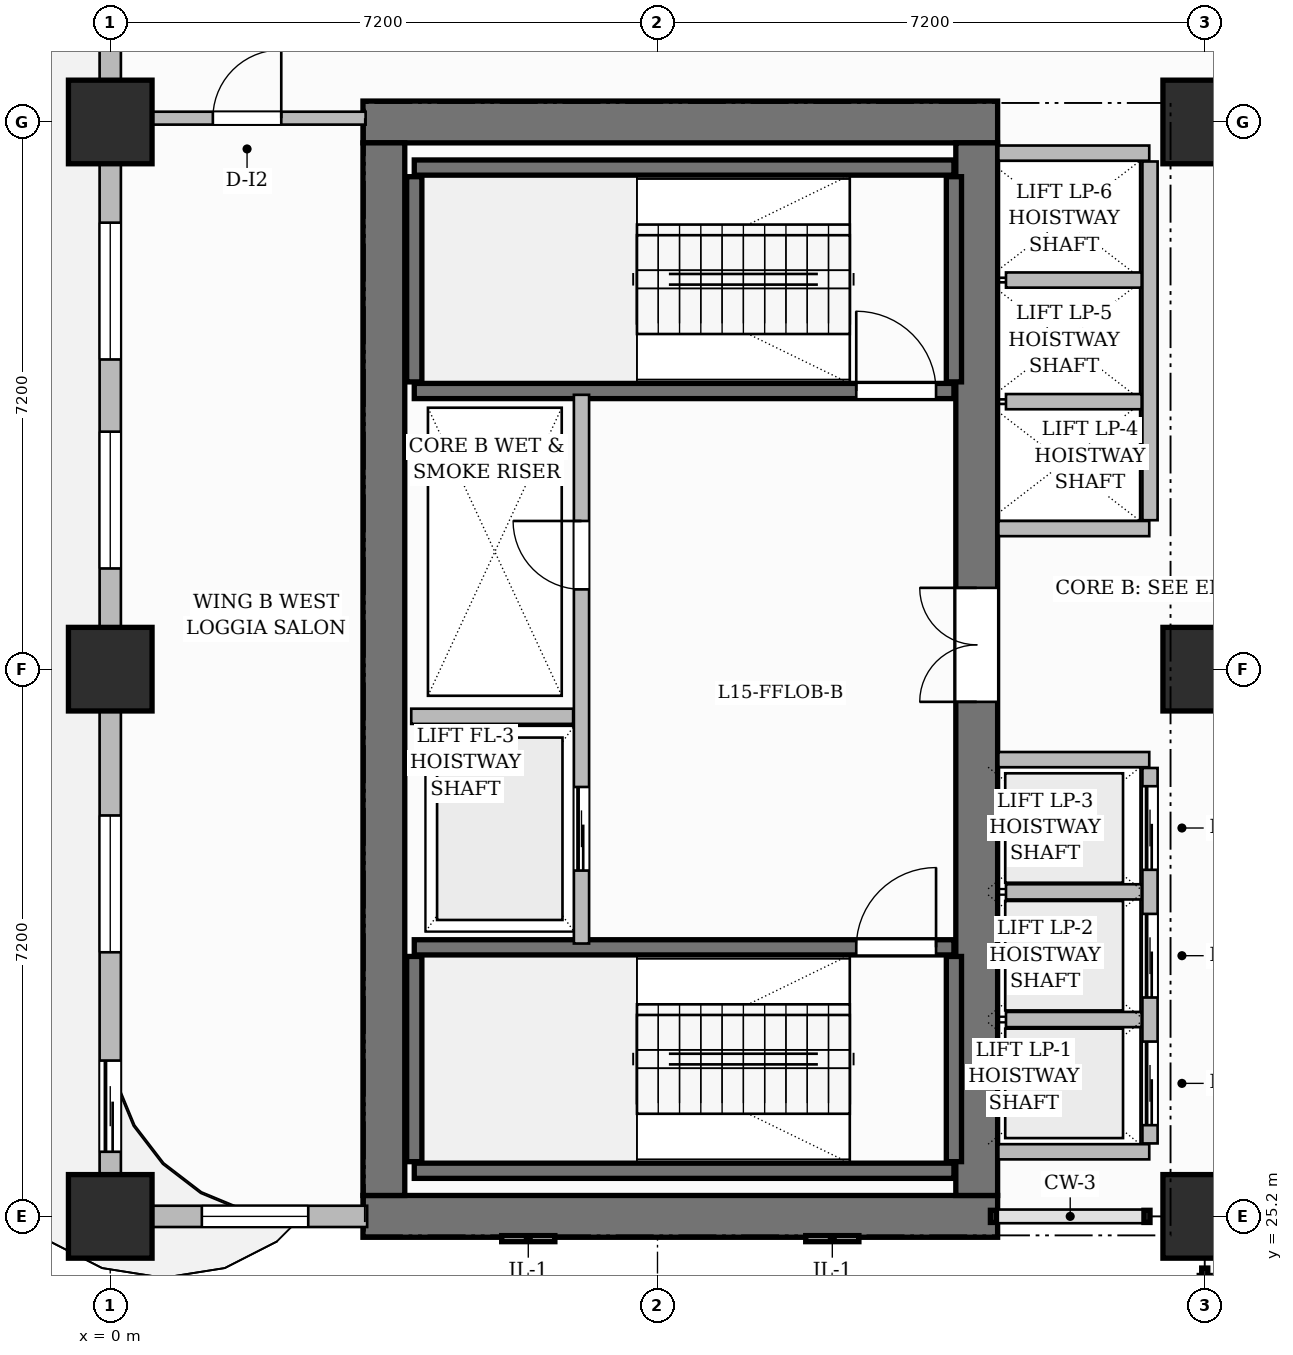
"""IFC4 building model, lengths in metres.
Left out: names, types, materials, properties, quantities, classifications, styles, units other than length and angle.
Written with IfcOpenShell. Run it as: python <this file> out.ifc"""

import sys

from ifc_helpers import new_model, si_unit, direction, frame, frame_2d, origin, origin_2d, place, context, subcontext, project, spatial, rectangle, extrude, source, transform, mapped, element, fill, save


model = new_model("IFC4")
c1 = context("Model", 3, precision=1e-05, world=origin(), true_north=direction((0.0, 1.0)))
c2 = subcontext(c1, "Body", "Model", "MODEL_VIEW")
j1 = project(units=[si_unit("LENGTHUNIT", "METRE"), si_unit("PLANEANGLEUNIT", "RADIAN")], contexts=[c1])
p1 = place(None, origin())
s1 = spatial("IfcSite", under=j1, at=p1, CompositionType="ELEMENT")
p2 = place(p1, origin())
s2 = spatial("IfcBuilding", under=s1, at=p2, CompositionType="ELEMENT")
p3 = place(p2, frame((0.0, 0.0, 65.7)))
s3 = spatial("IfcBuildingStorey", under=s2, at=p3, CompositionType="ELEMENT", Elevation=65.7)
for number, where, z_axis, x_axis in (
    (1, (3.325, 25.2, 0.0), (0.0, 0.0, 1.0), (1.0, 0.0, 0.0)),
    (2, (3.325, 39.6, 0.0), (0.0, 0.0, 1.0), (1.0, 0.0, 0.0)),
):
    element("IfcWall", number, at=place(p3, frame(where, z_axis=z_axis, x_axis=x_axis)), inside=s3, PredefinedType="SHEAR", context=c2, shape_type="SweptSolid", body=[
        extrude(rectangle(XDim=8.35, YDim=0.55, at=frame_2d((4.175, 0.0))), origin(), (0.0, 0.0, 1.0), 3.7),
    ])
p4 = place(p3, frame((3.6, 25.475, 0.0), z_axis=(0.0, 0.0, 1.0), x_axis=(0.0, 1.0, 0.0)))
e3 = element("IfcWall", 3, at=p4, inside=s3, PredefinedType="SHEAR", context=c2, shape_type="SweptSolid", body=[
    extrude(rectangle(XDim=13.85, YDim=0.55, at=frame_2d((6.925, 0.0))), origin(), (0.0, 0.0, 1.0), 3.7),
])
p5 = place(p3, frame((11.4, 25.475, 0.0), z_axis=(0.0, 0.0, 1.0), x_axis=(0.0, 1.0, 0.0)))
e4 = element("IfcWall", 4, at=p5, inside=s3, PredefinedType="SHEAR", context=c2, shape_type="SweptSolid", body=[
    extrude(rectangle(XDim=13.85, YDim=0.55, at=frame_2d((6.925, 0.0))), origin(), (0.0, 0.0, 1.0), 3.7),
])
p6 = place(p5, frame((6.495, 0.0, 0.0)))
e5 = element("IfcOpeningElement", 5, at=p6, cuts=e4, PredefinedType="OPENING", context=c2, shape_type="SweptSolid", body=[
    extrude(rectangle(XDim=1.5, YDim=2.2, at=frame_2d((0.75, 1.1))), frame((0.0, 0.285, 0.0), z_axis=(0.0, -1.0, 0.0), x_axis=(1.0, 0.0, 0.0)), (0.0, 0.0, 1.0), 0.57),
])
m1 = source(origin(), c2, "Body", "SweptSolid", [
    extrude(rectangle(XDim=1.1, YDim=1.1, at=origin_2d()), origin(), (0.0, 0.0, 1.0), 3.7),
])
for number, where, z_axis, x_axis in (
    (6, (0.0, 25.2, 0.0), (0.0, 0.0, 1.0), (1.0, 0.0, 0.0)),
    (7, (0.0, 32.4, 0.0), (0.0, 0.0, 1.0), (1.0, 0.0, 0.0)),
    (8, (0.0, 39.6, 0.0), (0.0, 0.0, 1.0), (1.0, 0.0, 0.0)),
    (9, (14.4, 25.2, 0.0), (0.0, 0.0, 1.0), (1.0, 0.0, 0.0)),
    (10, (14.4, 32.4, 0.0), (0.0, 0.0, 1.0), (1.0, 0.0, 0.0)),
    (11, (14.4, 39.6, 0.0), (0.0, 0.0, 1.0), (1.0, 0.0, 0.0)),
):
    element("IfcColumn", number, at=place(p3, frame(where, z_axis=z_axis, x_axis=x_axis)), inside=s3, PredefinedType="COLUMN", context=c2, shape_type="MappedRepresentation", body=[
        mapped(m1, transform((0.0, 0.0, 0.0), scale=1.0)),
    ])
p7 = place(p3, frame((4.0, 25.8, 0.0), z_axis=(0.0, 0.0, 1.0), x_axis=(1.0, 0.0, 0.0)))
e12 = element("IfcWall", 12, at=p7, inside=s3, PredefinedType="SHEAR", context=c2, shape_type="SweptSolid", body=[
    extrude(rectangle(XDim=7.1, YDim=0.2, at=frame_2d((3.55, 0.0))), origin(), (0.0, 0.0, 1.0), 3.7),
])
for number, where, z_axis, x_axis in (
    (13, (4.0, 25.92, 0.0), (0.0, 0.0, 1.0), (0.0, 1.0, 0.0)),
    (14, (11.1, 25.92, 0.0), (0.0, 0.0, 1.0), (0.0, 1.0, 0.0)),
):
    element("IfcWall", number, at=place(p3, frame(where, z_axis=z_axis, x_axis=x_axis)), inside=s3, PredefinedType="SHEAR", context=c2, shape_type="SweptSolid", body=[
        extrude(rectangle(XDim=2.7, YDim=0.2, at=frame_2d((1.35, 0.0))), origin(), (0.0, 0.0, 1.0), 3.7),
    ])
p8 = place(p3, frame((4.0, 28.74, 0.0), z_axis=(0.0, 0.0, 1.0), x_axis=(1.0, 0.0, 0.0)))
e15 = element("IfcWall", 15, at=p8, inside=s3, PredefinedType="SHEAR", context=c2, shape_type="SweptSolid", body=[
    extrude(rectangle(XDim=7.1, YDim=0.2, at=frame_2d((3.55, 0.0))), origin(), (0.0, 0.0, 1.0), 3.7),
])
p9 = place(p8, frame((5.815, 0.0, 0.0)))
e16 = element("IfcOpeningElement", 16, at=p9, cuts=e15, PredefinedType="OPENING", context=c2, shape_type="SweptSolid", body=[
    extrude(rectangle(XDim=1.05, YDim=2.2, at=frame_2d((0.525, 1.1))), frame((0.0, 0.11, 0.0), z_axis=(0.0, -1.0, 0.0), x_axis=(1.0, 0.0, 0.0)), (0.0, 0.0, 1.0), 0.22),
])
p10 = place(p3, frame((4.0, 39.0, 0.0), z_axis=(0.0, 0.0, 1.0), x_axis=(1.0, 0.0, 0.0)))
e17 = element("IfcWall", 17, at=p10, inside=s3, PredefinedType="SHEAR", context=c2, shape_type="SweptSolid", body=[
    extrude(rectangle(XDim=7.1, YDim=0.2, at=frame_2d((3.55, 0.0))), origin(), (0.0, 0.0, 1.0), 3.7),
])
for number, where, z_axis, x_axis in (
    (18, (4.0, 36.18, 0.0), (0.0, 0.0, 1.0), (0.0, 1.0, 0.0)),
    (19, (11.1, 36.18, 0.0), (0.0, 0.0, 1.0), (0.0, 1.0, 0.0)),
):
    element("IfcWall", number, at=place(p3, frame(where, z_axis=z_axis, x_axis=x_axis)), inside=s3, PredefinedType="SHEAR", context=c2, shape_type="SweptSolid", body=[
        extrude(rectangle(XDim=2.7, YDim=0.2, at=frame_2d((1.35, 0.0))), origin(), (0.0, 0.0, 1.0), 3.7),
    ])
p11 = place(p3, frame((4.0, 36.06, 0.0), z_axis=(0.0, 0.0, 1.0), x_axis=(1.0, 0.0, 0.0)))
e20 = element("IfcWall", 20, at=p11, inside=s3, PredefinedType="SHEAR", context=c2, shape_type="SweptSolid", body=[
    extrude(rectangle(XDim=7.1, YDim=0.2, at=frame_2d((3.55, 0.0))), origin(), (0.0, 0.0, 1.0), 3.7),
])
p12 = place(p11, frame((5.815, 0.0, 0.0)))
e21 = element("IfcOpeningElement", 21, at=p12, cuts=e20, PredefinedType="OPENING", context=c2, shape_type="SweptSolid", body=[
    extrude(rectangle(XDim=1.05, YDim=2.2, at=frame_2d((0.525, 1.1))), frame((0.0, 0.11, 0.0), z_axis=(0.0, -1.0, 0.0), x_axis=(1.0, 0.0, 0.0)), (0.0, 0.0, 1.0), 0.22),
])
p13 = place(p3, frame((6.2, 28.79, 0.0), z_axis=(0.0, 0.0, 1.0), x_axis=(0.0, 1.0, 0.0)))
e22 = element("IfcWall", 22, at=p13, inside=s3, PredefinedType="PARTITIONING", context=c2, shape_type="SweptSolid", body=[
    extrude(rectangle(XDim=7.22, YDim=0.2, at=frame_2d((3.61, 0.0))), origin(), (0.0, 0.0, 1.0), 3.45),
])
p14 = place(p13, frame((4.66, 0.0, 0.0)))
e23 = element("IfcOpeningElement", 23, at=p14, cuts=e22, PredefinedType="OPENING", context=c2, shape_type="SweptSolid", body=[
    extrude(rectangle(XDim=0.9, YDim=2.1, at=frame_2d((0.45, 1.05))), frame((0.0, 0.11, 0.0), z_axis=(0.0, -1.0, 0.0), x_axis=(1.0, 0.0, 0.0)), (0.0, 0.0, 1.0), 0.22),
])
p15 = place(p13, frame((0.96, 0.0, 0.0)))
e24 = element("IfcOpeningElement", 24, at=p15, cuts=e22, PredefinedType="OPENING", context=c2, shape_type="SweptSolid", body=[
    extrude(rectangle(XDim=1.1, YDim=2.2, at=frame_2d((0.55, 1.1))), frame((0.0, 0.11, 0.0), z_axis=(0.0, -1.0, 0.0), x_axis=(1.0, 0.0, 0.0)), (0.0, 0.0, 1.0), 0.22),
])
p16 = place(p3, frame((3.96, 31.78, 0.0), z_axis=(0.0, 0.0, 1.0), x_axis=(1.0, 0.0, 0.0)))
e25 = element("IfcWall", 25, at=p16, inside=s3, PredefinedType="PARTITIONING", context=c2, shape_type="SweptSolid", body=[
    extrude(rectangle(XDim=2.13, YDim=0.2, at=frame_2d((1.065, 0.0))), origin(), (0.0, 0.0, 1.0), 3.45),
])
for number, where, z_axis, x_axis in (
    (26, (11.685, 26.05, 0.0), (0.0, 0.0, 1.0), (1.0, 0.0, 0.0)),
    (27, (11.685, 31.21, 0.0), (0.0, 0.0, 1.0), (1.0, 0.0, 0.0)),
):
    element("IfcWall", number, at=place(p3, frame(where, z_axis=z_axis, x_axis=x_axis)), inside=s3, PredefinedType="PARTITIONING", context=c2, shape_type="SweptSolid", body=[
        extrude(rectangle(XDim=1.985, YDim=0.2, at=frame_2d((0.992, 0.0))), origin(), (0.0, 0.0, 1.0), 3.45),
    ])
p17 = place(p3, frame((13.68, 26.16, 0.0), z_axis=(0.0, 0.0, 1.0), x_axis=(0.0, 1.0, 0.0)))
e28 = element("IfcWall", 28, at=p17, inside=s3, PredefinedType="PARTITIONING", context=c2, shape_type="SweptSolid", body=[
    extrude(rectangle(XDim=4.94, YDim=0.2, at=frame_2d((2.47, 0.0))), origin(), (0.0, 0.0, 1.0), 3.45),
])
p18 = place(p17, frame((0.24, 0.0, 0.0)))
e29 = element("IfcOpeningElement", 29, at=p18, cuts=e28, PredefinedType="OPENING", context=c2, shape_type="SweptSolid", body=[
    extrude(rectangle(XDim=1.1, YDim=2.2, at=frame_2d((0.55, 1.1))), frame((0.0, 0.11, 0.0), z_axis=(0.0, -1.0, 0.0), x_axis=(1.0, 0.0, 0.0)), (0.0, 0.0, 1.0), 0.22),
])
p19 = place(p17, frame((1.92, 0.0, 0.0)))
e30 = element("IfcOpeningElement", 30, at=p19, cuts=e28, PredefinedType="OPENING", context=c2, shape_type="SweptSolid", body=[
    extrude(rectangle(XDim=1.1, YDim=2.2, at=frame_2d((0.55, 1.1))), frame((0.0, 0.11, 0.0), z_axis=(0.0, -1.0, 0.0), x_axis=(1.0, 0.0, 0.0)), (0.0, 0.0, 1.0), 0.22),
])
p20 = place(p17, frame((3.6, 0.0, 0.0)))
e31 = element("IfcOpeningElement", 31, at=p20, cuts=e28, PredefinedType="OPENING", context=c2, shape_type="SweptSolid", body=[
    extrude(rectangle(XDim=1.1, YDim=2.2, at=frame_2d((0.55, 1.1))), frame((0.0, 0.11, 0.0), z_axis=(0.0, -1.0, 0.0), x_axis=(1.0, 0.0, 0.0)), (0.0, 0.0, 1.0), 0.22),
])
for number, where, z_axis, x_axis in (
    (32, (11.785, 27.79, 0.0), (0.0, 0.0, 1.0), (1.0, 0.0, 0.0)),
    (33, (11.785, 29.47, 0.0), (0.0, 0.0, 1.0), (1.0, 0.0, 0.0)),
):
    element("IfcWall", number, at=place(p3, frame(where, z_axis=z_axis, x_axis=x_axis)), inside=s3, PredefinedType="PARTITIONING", context=c2, shape_type="SweptSolid", body=[
        extrude(rectangle(XDim=1.785, YDim=0.2, at=frame_2d((0.893, 0.0))), origin(), (0.0, 0.0, 1.0), 3.45),
    ])
for number, where, z_axis, x_axis in (
    (34, (11.685, 34.25, 0.0), (0.0, 0.0, 1.0), (1.0, 0.0, 0.0)),
    (35, (11.685, 39.19, 0.0), (0.0, 0.0, 1.0), (1.0, 0.0, 0.0)),
):
    element("IfcWall", number, at=place(p3, frame(where, z_axis=z_axis, x_axis=x_axis)), inside=s3, PredefinedType="PARTITIONING", context=c2, shape_type="SweptSolid", body=[
        extrude(rectangle(XDim=1.985, YDim=0.2, at=frame_2d((0.992, 0.0))), origin(), (0.0, 0.0, 1.0), 3.45),
    ])
p21 = place(p3, frame((13.68, 34.36, 0.0), z_axis=(0.0, 0.0, 1.0), x_axis=(0.0, 1.0, 0.0)))
e36 = element("IfcWall", 36, at=p21, inside=s3, PredefinedType="PARTITIONING", context=c2, shape_type="SweptSolid", body=[
    extrude(rectangle(XDim=4.72, YDim=0.2, at=frame_2d((2.36, 0.0))), origin(), (0.0, 0.0, 1.0), 3.45),
])
for number, where, z_axis, x_axis in (
    (37, (11.785, 35.92, 0.0), (0.0, 0.0, 1.0), (1.0, 0.0, 0.0)),
    (38, (11.785, 37.52, 0.0), (0.0, 0.0, 1.0), (1.0, 0.0, 0.0)),
):
    element("IfcWall", number, at=place(p3, frame(where, z_axis=z_axis, x_axis=x_axis)), inside=s3, PredefinedType="PARTITIONING", context=c2, shape_type="SweptSolid", body=[
        extrude(rectangle(XDim=1.785, YDim=0.2, at=frame_2d((0.893, 0.0))), origin(), (0.0, 0.0, 1.0), 3.45),
    ])
p22 = place(p3, frame((0.24, 39.65, 0.0), z_axis=(0.0, 0.0, 1.0), x_axis=(1.0, 0.0, 0.0)))
e39 = element("IfcWall", 39, at=p22, inside=s3, PredefinedType="PARTITIONING", context=c2, shape_type="SweptSolid", body=[
    extrude(rectangle(XDim=3.12, YDim=0.17, at=frame_2d((1.56, 0.0))), origin(), (0.0, 0.0, 1.0), 3.45),
])
p23 = place(p22, frame((1.11, 0.0, 0.0)))
e40 = element("IfcOpeningElement", 40, at=p23, cuts=e39, PredefinedType="OPENING", context=c2, shape_type="SweptSolid", body=[
    extrude(rectangle(XDim=0.9, YDim=2.15, at=frame_2d((0.45, 1.075))), frame((0.0, 0.095, 0.0), z_axis=(0.0, -1.0, 0.0), x_axis=(1.0, 0.0, 0.0)), (0.0, 0.0, 1.0), 0.19),
])
p24 = place(p3, frame((0.0, 25.2, 0.0), z_axis=(0.0, 0.0, 1.0), x_axis=(1.0, 0.0, 0.0)))
e41 = element("IfcWall", 41, at=p24, inside=s3, PredefinedType="SOLIDWALL", context=c2, shape_type="SweptSolid", body=[
    extrude(rectangle(XDim=3.38, YDim=0.28, at=frame_2d((1.69, 0.0))), origin(), (0.0, 0.0, 1.0), 3.45),
])
p25 = place(p24, frame((1.205, 0.0, 0.8)))
e42 = element("IfcOpeningElement", 42, at=p25, cuts=e41, PredefinedType="OPENING", context=c2, shape_type="SweptSolid", body=[
    extrude(rectangle(XDim=1.4, YDim=1.85, at=frame_2d((0.7, 0.925))), frame((0.0, 0.15, 0.0), z_axis=(0.0, -1.0, 0.0), x_axis=(1.0, 0.0, 0.0)), (0.0, 0.0, 1.0), 0.3),
])
p26 = place(p3, frame((0.0, 25.25, 0.0), z_axis=(0.0, 0.0, 1.0), x_axis=(0.0, 1.0, 0.0)))
e43 = element("IfcWall", 43, at=p26, inside=s3, PredefinedType="SOLIDWALL", context=c2, shape_type="SweptSolid", body=[
    extrude(rectangle(XDim=21.5, YDim=0.28, at=frame_2d((10.75, 0.0))), origin(), (0.0, 0.0, 1.0), 2.885),
])
p27 = place(p26, frame((18.45, 0.0, 0.0)))
e44 = element("IfcOpeningElement", 44, at=p27, cuts=e43, PredefinedType="OPENING", context=c2, shape_type="SweptSolid", body=[
    extrude(rectangle(XDim=1.2, YDim=2.2, at=frame_2d((0.6, 1.1))), frame((0.0, 0.15, 0.0), z_axis=(0.0, -1.0, 0.0), x_axis=(1.0, 0.0, 0.0)), (0.0, 0.0, 1.0), 0.3),
])
p28 = place(p26, frame((0.8, 0.0, 0.0)))
e45 = element("IfcOpeningElement", 45, at=p28, cuts=e43, PredefinedType="OPENING", context=c2, shape_type="SweptSolid", body=[
    extrude(rectangle(XDim=1.2, YDim=2.2, at=frame_2d((0.6, 1.1))), frame((0.0, 0.15, 0.0), z_axis=(0.0, -1.0, 0.0), x_axis=(1.0, 0.0, 0.0)), (0.0, 0.0, 1.0), 0.3),
])
p29 = place(p26, frame((3.425, 0.0, 0.8)))
e46 = element("IfcOpeningElement", 46, at=p29, cuts=e43, PredefinedType="OPENING", context=c2, shape_type="SweptSolid", body=[
    extrude(rectangle(XDim=1.8, YDim=1.85, at=frame_2d((0.9, 0.925))), frame((0.0, 0.15, 0.0), z_axis=(0.0, -1.0, 0.0), x_axis=(1.0, 0.0, 0.0)), (0.0, 0.0, 1.0), 0.3),
])
p30 = place(p26, frame((8.475, 0.0, 0.8)))
e47 = element("IfcOpeningElement", 47, at=p30, cuts=e43, PredefinedType="OPENING", context=c2, shape_type="SweptSolid", body=[
    extrude(rectangle(XDim=1.8, YDim=1.85, at=frame_2d((0.9, 0.925))), frame((0.0, 0.15, 0.0), z_axis=(0.0, -1.0, 0.0), x_axis=(1.0, 0.0, 0.0)), (0.0, 0.0, 1.0), 0.3),
])
p31 = place(p26, frame((11.225, 0.0, 0.8)))
e48 = element("IfcOpeningElement", 48, at=p31, cuts=e43, PredefinedType="OPENING", context=c2, shape_type="SweptSolid", body=[
    extrude(rectangle(XDim=1.8, YDim=1.85, at=frame_2d((0.9, 0.925))), frame((0.0, 0.15, 0.0), z_axis=(0.0, -1.0, 0.0), x_axis=(1.0, 0.0, 0.0)), (0.0, 0.0, 1.0), 0.3),
])
p32 = place(p26, frame((15.75, 0.0, 0.8)))
e49 = element("IfcOpeningElement", 49, at=p32, cuts=e43, PredefinedType="OPENING", context=c2, shape_type="SweptSolid", body=[
    extrude(rectangle(XDim=1.8, YDim=1.85, at=frame_2d((0.9, 0.925))), frame((0.0, 0.15, 0.0), z_axis=(0.0, -1.0, 0.0), x_axis=(1.0, 0.0, 0.0)), (0.0, 0.0, 1.0), 0.3),
])
m2 = source(origin(), c2, "Body", "SweptSolid", [
    extrude(rectangle(XDim=1.05, YDim=2.2, at=frame_2d((0.525, 1.1))), frame((0.0, 0.025, 0.0), z_axis=(0.0, -1.0, 0.0), x_axis=(1.0, 0.0, 0.0)), (0.0, 0.0, 1.0), 0.05),
])
p33 = place(p9, origin())
e50 = element("IfcDoor", 50, at=p33, inside=s3, OperationType="SINGLE_SWING_RIGHT", PredefinedType="DOOR", context=c2, shape_type="MappedRepresentation", body=[
    mapped(m2, transform((0.0, 0.0, 0.0), scale=1.0)),
])
fill(e16, e50)
p34 = place(p12, origin())
e51 = element("IfcDoor", 51, at=p34, inside=s3, OperationType="SINGLE_SWING_LEFT", PredefinedType="DOOR", context=c2, shape_type="MappedRepresentation", body=[
    mapped(m2, transform((0.0, 0.0, 0.0), scale=1.0)),
])
fill(e21, e51)
m3 = source(origin(), c2, "Body", "SweptSolid", [
    extrude(rectangle(XDim=0.9, YDim=2.1, at=frame_2d((0.45, 1.05))), frame((0.0, 0.025, 0.0), z_axis=(0.0, -1.0, 0.0), x_axis=(1.0, 0.0, 0.0)), (0.0, 0.0, 1.0), 0.05),
])
p35 = place(p14, origin())
e52 = element("IfcDoor", 52, at=p35, inside=s3, OperationType="SINGLE_SWING_RIGHT", PredefinedType="DOOR", context=c2, shape_type="MappedRepresentation", body=[
    mapped(m3, transform((0.0, 0.0, 0.0), scale=1.0)),
])
fill(e23, e52)
m4 = source(origin(), c2, "Body", "SweptSolid", [
    extrude(rectangle(XDim=1.5, YDim=2.2, at=frame_2d((0.75, 1.1))), frame((0.0, 0.025, 0.0), z_axis=(0.0, -1.0, 0.0), x_axis=(1.0, 0.0, 0.0)), (0.0, 0.0, 1.0), 0.05),
])
p36 = place(p6, origin())
e53 = element("IfcDoor", 53, at=p36, inside=s3, OperationType="DOUBLE_DOOR_SINGLE_SWING", PredefinedType="DOOR", context=c2, shape_type="MappedRepresentation", body=[
    mapped(m4, transform((0.0, 0.0, 0.0), scale=1.0)),
])
fill(e5, e53)
m5 = source(origin(), c2, "Body", "SweptSolid", [
    extrude(rectangle(XDim=0.9, YDim=2.15, at=frame_2d((0.45, 1.075))), frame((0.0, 0.025, 0.0), z_axis=(0.0, -1.0, 0.0), x_axis=(1.0, 0.0, 0.0)), (0.0, 0.0, 1.0), 0.05),
])
p37 = place(p23, origin())
e54 = element("IfcDoor", 54, at=p37, inside=s3, OperationType="SINGLE_SWING_RIGHT", PredefinedType="DOOR", context=c2, shape_type="MappedRepresentation", body=[
    mapped(m5, transform((0.0, 0.0, 0.0), scale=1.0)),
])
fill(e40, e54)
m6 = source(origin(), c2, "Body", "SweptSolid", [
    extrude(rectangle(XDim=1.1, YDim=2.2, at=frame_2d((0.55, 1.1))), frame((0.0, 0.025, 0.0), z_axis=(0.0, -1.0, 0.0), x_axis=(1.0, 0.0, 0.0)), (0.0, 0.0, 1.0), 0.05),
])
p38 = place(p15, origin())
e55 = element("IfcDoor", 55, at=p38, inside=s3, OperationType="SLIDING_TO_LEFT", PredefinedType="DOOR", context=c2, shape_type="MappedRepresentation", body=[
    mapped(m6, transform((0.0, 0.0, 0.0), scale=1.0)),
])
fill(e24, e55)
p39 = place(p18, origin())
e56 = element("IfcDoor", 56, at=p39, inside=s3, OperationType="SLIDING_TO_LEFT", PredefinedType="DOOR", context=c2, shape_type="MappedRepresentation", body=[
    mapped(m6, transform((0.0, 0.0, 0.0), scale=1.0)),
])
fill(e29, e56)
p40 = place(p19, origin())
e57 = element("IfcDoor", 57, at=p40, inside=s3, OperationType="SLIDING_TO_LEFT", PredefinedType="DOOR", context=c2, shape_type="MappedRepresentation", body=[
    mapped(m6, transform((0.0, 0.0, 0.0), scale=1.0)),
])
fill(e30, e57)
p41 = place(p20, origin())
e58 = element("IfcDoor", 58, at=p41, inside=s3, OperationType="SLIDING_TO_LEFT", PredefinedType="DOOR", context=c2, shape_type="MappedRepresentation", body=[
    mapped(m6, transform((0.0, 0.0, 0.0), scale=1.0)),
])
fill(e31, e58)
m7 = source(origin(), c2, "Body", "SweptSolid", [
    extrude(rectangle(XDim=1.2, YDim=2.2, at=frame_2d((0.6, 1.1))), frame((0.0, 0.025, 0.0), z_axis=(0.0, -1.0, 0.0), x_axis=(1.0, 0.0, 0.0)), (0.0, 0.0, 1.0), 0.05),
])
p42 = place(p28, origin())
e59 = element("IfcDoor", 59, at=p42, inside=s3, OperationType="SLIDING_TO_LEFT", PredefinedType="DOOR", context=c2, shape_type="MappedRepresentation", body=[
    mapped(m7, transform((0.0, 0.0, 0.0), scale=1.0)),
])
fill(e45, e59)
m8 = source(origin(), c2, "Body", "SweptSolid", [
    extrude(rectangle(XDim=1.4, YDim=1.85, at=frame_2d((0.7, 0.925))), frame((0.0, 0.03, 0.0), z_axis=(0.0, -1.0, 0.0), x_axis=(1.0, 0.0, 0.0)), (0.0, 0.0, 1.0), 0.06),
])
p43 = place(p25, origin())
e60 = element("IfcWindow", 60, at=p43, inside=s3, PartitioningType="SINGLE_PANEL", PredefinedType="WINDOW", context=c2, shape_type="MappedRepresentation", body=[
    mapped(m8, transform((0.0, 0.0, 0.0), scale=1.0)),
])
fill(e42, e60)
m9 = source(origin(), c2, "Body", "SweptSolid", [
    extrude(rectangle(XDim=1.8, YDim=1.85, at=frame_2d((0.9, 0.925))), frame((0.0, 0.03, 0.0), z_axis=(0.0, -1.0, 0.0), x_axis=(1.0, 0.0, 0.0)), (0.0, 0.0, 1.0), 0.06),
])
p44 = place(p29, origin())
e61 = element("IfcWindow", 61, at=p44, inside=s3, PartitioningType="DOUBLE_PANEL_VERTICAL", PredefinedType="WINDOW", context=c2, shape_type="MappedRepresentation", body=[
    mapped(m9, transform((0.0, 0.0, 0.0), scale=1.0)),
])
fill(e46, e61)
p45 = place(p30, origin())
e62 = element("IfcWindow", 62, at=p45, inside=s3, PartitioningType="DOUBLE_PANEL_VERTICAL", PredefinedType="WINDOW", context=c2, shape_type="MappedRepresentation", body=[
    mapped(m9, transform((0.0, 0.0, 0.0), scale=1.0)),
])
fill(e47, e62)
p46 = place(p31, origin())
e63 = element("IfcWindow", 63, at=p46, inside=s3, PartitioningType="DOUBLE_PANEL_VERTICAL", PredefinedType="WINDOW", context=c2, shape_type="MappedRepresentation", body=[
    mapped(m9, transform((0.0, 0.0, 0.0), scale=1.0)),
])
fill(e48, e63)
save(model, sys.argv[1])
